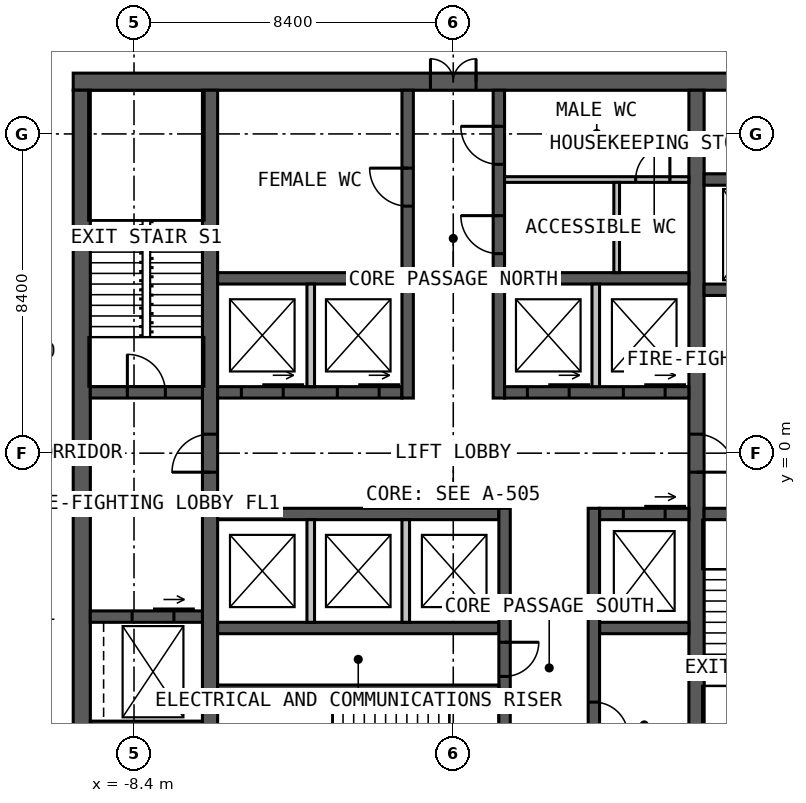
"""IFC4 building model, lengths in metres.
Left out: names, types, materials, properties, quantities, classifications, styles, units other than length and angle.
Written with IfcOpenShell. Run it as: python <this file> out.ifc"""

import sys

from ifc_helpers import new_model, si_unit, direction, frame, frame_2d, origin, place, context, subcontext, project, spatial, rectangle, extrude, element, fill, save


model = new_model("IFC4")
c1 = context("Model", 3, precision=1e-05, world=origin(), true_north=direction((0.0, 1.0)))
c2 = subcontext(c1, "Body", "Model", "MODEL_VIEW")
j1 = project(units=[si_unit("LENGTHUNIT", "METRE"), si_unit("PLANEANGLEUNIT", "RADIAN")], contexts=[c1])
p1 = place(None, origin())
s1 = spatial("IfcSite", under=j1, at=p1, CompositionType="ELEMENT")
p2 = place(p1, origin())
s2 = spatial("IfcBuilding", under=s1, at=p2, CompositionType="ELEMENT")
p3 = place(p2, frame((0.0, 0.0, 159.0)))
s3 = spatial("IfcBuildingStorey", under=s2, at=p3, CompositionType="ELEMENT", Elevation=159.0)
p4 = place(p3, frame((-10.0, 9.775, 0.0), z_axis=(0.0, 0.0, 1.0), x_axis=(1.0, 0.0, 0.0)))
e1 = element("IfcWall", 1, at=p4, inside=s3, PredefinedType="SOLIDWALL", context=c2, shape_type="SweptSolid", body=[
    extrude(rectangle(XDim=20.0, YDim=0.45, at=frame_2d((10.0, 0.0))), origin(), (0.0, 0.0, 1.0), 4.0),
])
p5 = place(p4, frame((9.4, 0.0, 0.0)))
e2 = element("IfcOpeningElement", 2, at=p5, cuts=e1, PredefinedType="OPENING", context=c2, shape_type="SweptSolid", body=[
    extrude(rectangle(XDim=1.2, YDim=2.2, at=frame_2d((0.6, 1.1))), frame((0.0, 0.235, 0.0), z_axis=(0.0, -1.0, 0.0), x_axis=(1.0, 0.0, 0.0)), (0.0, 0.0, 1.0), 0.47),
])
p6 = place(p3, frame((-9.775, 9.55, 0.0), z_axis=(0.0, 0.0, 1.0), x_axis=(0.0, -1.0, 0.0)))
e3 = element("IfcWall", 3, at=p6, inside=s3, PredefinedType="SOLIDWALL", context=c2, shape_type="SweptSolid", body=[
    extrude(rectangle(XDim=19.1, YDim=0.45, at=frame_2d((9.55, 0.0))), origin(), (0.0, 0.0, 1.0), 4.0),
])
p7 = place(p3, frame((-6.4, -9.55, 0.0), z_axis=(0.0, 0.0, 1.0), x_axis=(0.0, 1.0, 0.0)))
e4 = element("IfcWall", 4, at=p7, inside=s3, PredefinedType="SOLIDWALL", context=c2, shape_type="SweptSolid", body=[
    extrude(rectangle(XDim=19.1, YDim=0.4, at=frame_2d((9.55, 0.0))), origin(), (0.0, 0.0, 1.0), 4.0),
])
p8 = place(p7, frame((9.05, 0.0, 0.0)))
e5 = element("IfcOpeningElement", 5, at=p8, cuts=e4, PredefinedType="OPENING", context=c2, shape_type="SweptSolid", body=[
    extrude(rectangle(XDim=1.0, YDim=2.2, at=frame_2d((0.5, 1.1))), frame((0.0, 0.21, 0.0), z_axis=(0.0, -1.0, 0.0), x_axis=(1.0, 0.0, 0.0)), (0.0, 0.0, 1.0), 0.42),
])
p9 = place(p3, frame((6.4, 9.55, 0.0), z_axis=(0.0, 0.0, 1.0), x_axis=(0.0, -1.0, 0.0)))
e6 = element("IfcWall", 6, at=p9, inside=s3, PredefinedType="SOLIDWALL", context=c2, shape_type="SweptSolid", body=[
    extrude(rectangle(XDim=19.1, YDim=0.4, at=frame_2d((9.55, 0.0))), origin(), (0.0, 0.0, 1.0), 4.0),
])
p10 = place(p9, frame((9.05, 0.0, 0.0)))
e7 = element("IfcOpeningElement", 7, at=p10, cuts=e6, PredefinedType="OPENING", context=c2, shape_type="SweptSolid", body=[
    extrude(rectangle(XDim=1.0, YDim=2.2, at=frame_2d((0.5, 1.1))), frame((0.0, 0.21, 0.0), z_axis=(0.0, -1.0, 0.0), x_axis=(1.0, 0.0, 0.0)), (0.0, 0.0, 1.0), 0.42),
])
p11 = place(p3, frame((-6.2, 1.6, 0.0), z_axis=(0.0, 0.0, 1.0), x_axis=(1.0, 0.0, 0.0)))
e8 = element("IfcWall", 8, at=p11, inside=s3, PredefinedType="SOLIDWALL", context=c2, shape_type="SweptSolid", body=[
    extrude(rectangle(XDim=4.85, YDim=0.3, at=frame_2d((2.425, 0.0))), origin(), (0.0, 0.0, 1.0), 4.0),
])
p12 = place(p11, frame((0.625, 0.0, 0.0)))
e9 = element("IfcOpeningElement", 9, at=p12, cuts=e8, PredefinedType="OPENING", context=c2, shape_type="SweptSolid", body=[
    extrude(rectangle(XDim=1.1, YDim=2.2, at=frame_2d((0.55, 1.1))), frame((0.0, 0.16, 0.0), z_axis=(0.0, -1.0, 0.0), x_axis=(1.0, 0.0, 0.0)), (0.0, 0.0, 1.0), 0.32),
])
p13 = place(p11, frame((3.15, 0.0, 0.0)))
e10 = element("IfcOpeningElement", 10, at=p13, cuts=e8, PredefinedType="OPENING", context=c2, shape_type="SweptSolid", body=[
    extrude(rectangle(XDim=1.1, YDim=2.2, at=frame_2d((0.55, 1.1))), frame((0.0, 0.16, 0.0), z_axis=(0.0, -1.0, 0.0), x_axis=(1.0, 0.0, 0.0)), (0.0, 0.0, 1.0), 0.32),
])
p14 = place(p3, frame((1.35, 1.6, 0.0), z_axis=(0.0, 0.0, 1.0), x_axis=(1.0, 0.0, 0.0)))
e11 = element("IfcWall", 11, at=p14, inside=s3, PredefinedType="SOLIDWALL", context=c2, shape_type="SweptSolid", body=[
    extrude(rectangle(XDim=4.85, YDim=0.3, at=frame_2d((2.425, 0.0))), origin(), (0.0, 0.0, 1.0), 4.0),
])
p15 = place(p14, frame((0.6, 0.0, 0.0)))
e12 = element("IfcOpeningElement", 12, at=p15, cuts=e11, PredefinedType="OPENING", context=c2, shape_type="SweptSolid", body=[
    extrude(rectangle(XDim=1.1, YDim=2.2, at=frame_2d((0.55, 1.1))), frame((0.0, 0.16, 0.0), z_axis=(0.0, -1.0, 0.0), x_axis=(1.0, 0.0, 0.0)), (0.0, 0.0, 1.0), 0.32),
])
p16 = place(p14, frame((3.125, 0.0, 0.0)))
e13 = element("IfcOpeningElement", 13, at=p16, cuts=e11, PredefinedType="OPENING", context=c2, shape_type="SweptSolid", body=[
    extrude(rectangle(XDim=1.1, YDim=2.2, at=frame_2d((0.55, 1.1))), frame((0.0, 0.16, 0.0), z_axis=(0.0, -1.0, 0.0), x_axis=(1.0, 0.0, 0.0)), (0.0, 0.0, 1.0), 0.32),
])
for number, where, z_axis, x_axis in (
    (14, (-6.2, 4.6, 0.0), (0.0, 0.0, 1.0), (1.0, 0.0, 0.0)),
    (15, (1.35, 4.6, 0.0), (0.0, 0.0, 1.0), (1.0, 0.0, 0.0)),
):
    element("IfcWall", number, at=place(p3, frame(where, z_axis=z_axis, x_axis=x_axis)), inside=s3, PredefinedType="SOLIDWALL", context=c2, shape_type="SweptSolid", body=[
        extrude(rectangle(XDim=4.85, YDim=0.3, at=frame_2d((2.425, 0.0))), origin(), (0.0, 0.0, 1.0), 4.0),
    ])
p17 = place(p3, frame((-1.2, 1.45, 0.0), z_axis=(0.0, 0.0, 1.0), x_axis=(0.0, 1.0, 0.0)))
e16 = element("IfcWall", 16, at=p17, inside=s3, PredefinedType="SOLIDWALL", context=c2, shape_type="SweptSolid", body=[
    extrude(rectangle(XDim=8.1, YDim=0.3, at=frame_2d((4.05, 0.0))), origin(), (0.0, 0.0, 1.0), 4.0),
])
p18 = place(p17, frame((5.05, 0.0, 0.0)))
e17 = element("IfcOpeningElement", 17, at=p18, cuts=e16, PredefinedType="OPENING", context=c2, shape_type="SweptSolid", body=[
    extrude(rectangle(XDim=1.0, YDim=2.2, at=frame_2d((0.5, 1.1))), frame((0.0, 0.16, 0.0), z_axis=(0.0, -1.0, 0.0), x_axis=(1.0, 0.0, 0.0)), (0.0, 0.0, 1.0), 0.32),
])
p19 = place(p3, frame((1.2, 1.45, 0.0), z_axis=(0.0, 0.0, 1.0), x_axis=(0.0, 1.0, 0.0)))
e18 = element("IfcWall", 18, at=p19, inside=s3, PredefinedType="SOLIDWALL", context=c2, shape_type="SweptSolid", body=[
    extrude(rectangle(XDim=8.1, YDim=0.3, at=frame_2d((4.05, 0.0))), origin(), (0.0, 0.0, 1.0), 4.0),
])
p20 = place(p19, frame((3.8, 0.0, 0.0)))
e19 = element("IfcOpeningElement", 19, at=p20, cuts=e18, PredefinedType="OPENING", context=c2, shape_type="SweptSolid", body=[
    extrude(rectangle(XDim=1.0, YDim=2.2, at=frame_2d((0.5, 1.1))), frame((0.0, 0.16, 0.0), z_axis=(0.0, -1.0, 0.0), x_axis=(1.0, 0.0, 0.0)), (0.0, 0.0, 1.0), 0.32),
])
p21 = place(p19, frame((6.15, 0.0, 0.0)))
e20 = element("IfcOpeningElement", 20, at=p21, cuts=e18, PredefinedType="OPENING", context=c2, shape_type="SweptSolid", body=[
    extrude(rectangle(XDim=1.0, YDim=2.2, at=frame_2d((0.5, 1.1))), frame((0.0, 0.16, 0.0), z_axis=(0.0, -1.0, 0.0), x_axis=(1.0, 0.0, 0.0)), (0.0, 0.0, 1.0), 0.32),
])
p22 = place(p3, frame((-6.2, -1.6, 0.0), z_axis=(0.0, 0.0, 1.0), x_axis=(1.0, 0.0, 0.0)))
e21 = element("IfcWall", 21, at=p22, inside=s3, PredefinedType="SOLIDWALL", context=c2, shape_type="SweptSolid", body=[
    extrude(rectangle(XDim=7.4, YDim=0.3, at=frame_2d((3.7, 0.0))), origin(), (0.0, 0.0, 1.0), 4.0),
])
p23 = place(p3, frame((3.85, -1.6, 0.0), z_axis=(0.0, 0.0, 1.0), x_axis=(1.0, 0.0, 0.0)))
e22 = element("IfcWall", 22, at=p23, inside=s3, PredefinedType="SOLIDWALL", context=c2, shape_type="SweptSolid", body=[
    extrude(rectangle(XDim=2.35, YDim=0.3, at=frame_2d((1.175, 0.0))), origin(), (0.0, 0.0, 1.0), 4.0),
])
p24 = place(p23, frame((0.625, 0.0, 0.0)))
e23 = element("IfcOpeningElement", 23, at=p24, cuts=e22, PredefinedType="OPENING", context=c2, shape_type="SweptSolid", body=[
    extrude(rectangle(XDim=1.1, YDim=2.2, at=frame_2d((0.55, 1.1))), frame((0.0, 0.16, 0.0), z_axis=(0.0, -1.0, 0.0), x_axis=(1.0, 0.0, 0.0)), (0.0, 0.0, 1.0), 0.32),
])
p25 = place(p3, frame((-6.2, -4.6, 0.0), z_axis=(0.0, 0.0, 1.0), x_axis=(1.0, 0.0, 0.0)))
e24 = element("IfcWall", 24, at=p25, inside=s3, PredefinedType="SOLIDWALL", context=c2, shape_type="SweptSolid", body=[
    extrude(rectangle(XDim=7.4, YDim=0.3, at=frame_2d((3.7, 0.0))), origin(), (0.0, 0.0, 1.0), 4.0),
])
p26 = place(p3, frame((3.85, -4.6, 0.0), z_axis=(0.0, 0.0, 1.0), x_axis=(1.0, 0.0, 0.0)))
e25 = element("IfcWall", 25, at=p26, inside=s3, PredefinedType="SOLIDWALL", context=c2, shape_type="SweptSolid", body=[
    extrude(rectangle(XDim=2.35, YDim=0.3, at=frame_2d((1.175, 0.0))), origin(), (0.0, 0.0, 1.0), 4.0),
])
p27 = place(p3, frame((1.35, -1.45, 0.0), z_axis=(0.0, 0.0, 1.0), x_axis=(0.0, -1.0, 0.0)))
e26 = element("IfcWall", 26, at=p27, inside=s3, PredefinedType="SOLIDWALL", context=c2, shape_type="SweptSolid", body=[
    extrude(rectangle(XDim=8.1, YDim=0.3, at=frame_2d((4.05, 0.0))), origin(), (0.0, 0.0, 1.0), 4.0),
])
p28 = place(p27, frame((5.975, 0.0, 0.0)))
e27 = element("IfcOpeningElement", 27, at=p28, cuts=e26, PredefinedType="OPENING", context=c2, shape_type="SweptSolid", body=[
    extrude(rectangle(XDim=1.0, YDim=2.2, at=frame_2d((0.5, 1.1))), frame((0.0, 0.16, 0.0), z_axis=(0.0, -1.0, 0.0), x_axis=(1.0, 0.0, 0.0)), (0.0, 0.0, 1.0), 0.32),
])
p29 = place(p27, frame((3.525, 0.0, 0.0)))
e28 = element("IfcOpeningElement", 28, at=p29, cuts=e26, PredefinedType="OPENING", context=c2, shape_type="SweptSolid", body=[
    extrude(rectangle(XDim=0.9, YDim=2.2, at=frame_2d((0.45, 1.1))), frame((0.0, 0.16, 0.0), z_axis=(0.0, -1.0, 0.0), x_axis=(1.0, 0.0, 0.0)), (0.0, 0.0, 1.0), 0.32),
])
p30 = place(p3, frame((3.7, -1.45, 0.0), z_axis=(0.0, 0.0, 1.0), x_axis=(0.0, -1.0, 0.0)))
e29 = element("IfcWall", 29, at=p30, inside=s3, PredefinedType="SOLIDWALL", context=c2, shape_type="SweptSolid", body=[
    extrude(rectangle(XDim=8.1, YDim=0.3, at=frame_2d((4.05, 0.0))), origin(), (0.0, 0.0, 1.0), 4.0),
])
p31 = place(p30, frame((5.1, 0.0, 0.0)))
e30 = element("IfcOpeningElement", 30, at=p31, cuts=e29, PredefinedType="OPENING", context=c2, shape_type="SweptSolid", body=[
    extrude(rectangle(XDim=0.9, YDim=2.2, at=frame_2d((0.45, 1.1))), frame((0.0, 0.16, 0.0), z_axis=(0.0, -1.0, 0.0), x_axis=(1.0, 0.0, 0.0)), (0.0, 0.0, 1.0), 0.32),
])
p32 = place(p3, frame((-6.2, -6.2, 0.0), z_axis=(0.0, 0.0, 1.0), x_axis=(1.0, 0.0, 0.0)))
e31 = element("IfcWall", 31, at=p32, inside=s3, PredefinedType="SOLIDWALL", context=c2, shape_type="SweptSolid", body=[
    extrude(rectangle(XDim=7.4, YDim=0.2, at=frame_2d((3.7, 0.0))), origin(), (0.0, 0.0, 1.0), 4.0),
])
p33 = place(p3, frame((-9.55, 1.6, 0.0), z_axis=(0.0, 0.0, 1.0), x_axis=(1.0, 0.0, 0.0)))
e32 = element("IfcWall", 32, at=p33, inside=s3, PredefinedType="SOLIDWALL", context=c2, shape_type="SweptSolid", body=[
    extrude(rectangle(XDim=2.95, YDim=0.3, at=frame_2d((1.475, 0.0))), origin(), (0.0, 0.0, 1.0), 4.0),
])
p34 = place(p33, frame((0.975, 0.0, 0.0)))
e33 = element("IfcOpeningElement", 33, at=p34, cuts=e32, PredefinedType="OPENING", context=c2, shape_type="SweptSolid", body=[
    extrude(rectangle(XDim=1.0, YDim=2.2, at=frame_2d((0.5, 1.1))), frame((0.0, 0.16, 0.0), z_axis=(0.0, -1.0, 0.0), x_axis=(1.0, 0.0, 0.0)), (0.0, 0.0, 1.0), 0.32),
])
p35 = place(p3, frame((6.6, -1.6, 0.0), z_axis=(0.0, 0.0, 1.0), x_axis=(1.0, 0.0, 0.0)))
e34 = element("IfcWall", 34, at=p35, inside=s3, PredefinedType="SOLIDWALL", context=c2, shape_type="SweptSolid", body=[
    extrude(rectangle(XDim=2.95, YDim=0.3, at=frame_2d((1.475, 0.0))), origin(), (0.0, 0.0, 1.0), 4.0),
])
p36 = place(p35, frame((0.975, 0.0, 0.0)))
e35 = element("IfcOpeningElement", 35, at=p36, cuts=e34, PredefinedType="OPENING", context=c2, shape_type="SweptSolid", body=[
    extrude(rectangle(XDim=1.0, YDim=2.2, at=frame_2d((0.5, 1.1))), frame((0.0, 0.16, 0.0), z_axis=(0.0, -1.0, 0.0), x_axis=(1.0, 0.0, 0.0)), (0.0, 0.0, 1.0), 0.32),
])
p37 = place(p3, frame((-9.55, -4.3, 0.0), z_axis=(0.0, 0.0, 1.0), x_axis=(1.0, 0.0, 0.0)))
e36 = element("IfcWall", 36, at=p37, inside=s3, PredefinedType="SOLIDWALL", context=c2, shape_type="SweptSolid", body=[
    extrude(rectangle(XDim=2.95, YDim=0.3, at=frame_2d((1.475, 0.0))), origin(), (0.0, 0.0, 1.0), 4.0),
])
p38 = place(p37, frame((1.1, 0.0, 0.0)))
e37 = element("IfcOpeningElement", 37, at=p38, cuts=e36, PredefinedType="OPENING", context=c2, shape_type="SweptSolid", body=[
    extrude(rectangle(XDim=1.1, YDim=2.2, at=frame_2d((0.55, 1.1))), frame((0.0, 0.16, 0.0), z_axis=(0.0, -1.0, 0.0), x_axis=(1.0, 0.0, 0.0)), (0.0, 0.0, 1.0), 0.32),
])
p39 = place(p3, frame((6.6, 4.3, 0.0), z_axis=(0.0, 0.0, 1.0), x_axis=(1.0, 0.0, 0.0)))
e38 = element("IfcWall", 38, at=p39, inside=s3, PredefinedType="SOLIDWALL", context=c2, shape_type="SweptSolid", body=[
    extrude(rectangle(XDim=2.95, YDim=0.3, at=frame_2d((1.475, 0.0))), origin(), (0.0, 0.0, 1.0), 4.0),
])
p40 = place(p39, frame((0.75, 0.0, 0.0)))
e39 = element("IfcOpeningElement", 39, at=p40, cuts=e38, PredefinedType="OPENING", context=c2, shape_type="SweptSolid", body=[
    extrude(rectangle(XDim=1.1, YDim=2.2, at=frame_2d((0.55, 1.1))), frame((0.0, 0.16, 0.0), z_axis=(0.0, -1.0, 0.0), x_axis=(1.0, 0.0, 0.0)), (0.0, 0.0, 1.0), 0.32),
])
for number, where, z_axis, x_axis in (
    (40, (-9.55, -7.2, 0.0), (0.0, 0.0, 1.0), (1.0, 0.0, 0.0)),
    (41, (6.6, 7.2, 0.0), (0.0, 0.0, 1.0), (1.0, 0.0, 0.0)),
):
    element("IfcWall", number, at=place(p3, frame(where, z_axis=z_axis, x_axis=x_axis)), inside=s3, PredefinedType="SOLIDWALL", context=c2, shape_type="SweptSolid", body=[
        extrude(rectangle(XDim=2.95, YDim=0.3, at=frame_2d((1.475, 0.0))), origin(), (0.0, 0.0, 1.0), 4.0),
    ])
for number, where, z_axis, x_axis in (
    (42, (-3.75, 1.75, 0.0), (0.0, 0.0, 1.0), (0.0, 1.0, 0.0)),
    (43, (3.75, 1.75, 0.0), (0.0, 0.0, 1.0), (0.0, 1.0, 0.0)),
    (44, (-3.75, -1.75, 0.0), (0.0, 0.0, 1.0), (0.0, -1.0, 0.0)),
    (45, (-1.25, -1.75, 0.0), (0.0, 0.0, 1.0), (0.0, -1.0, 0.0)),
):
    element("IfcWall", number, at=place(p3, frame(where, z_axis=z_axis, x_axis=x_axis)), inside=s3, PredefinedType="SOLIDWALL", context=c2, shape_type="SweptSolid", body=[
        extrude(rectangle(XDim=2.7, YDim=0.2, at=frame_2d((1.35, 0.0))), origin(), (0.0, 0.0, 1.0), 3.75),
    ])
p41 = place(p3, frame((1.35, 7.2, 0.0), z_axis=(0.0, 0.0, 1.0), x_axis=(1.0, 0.0, 0.0)))
e46 = element("IfcWall", 46, at=p41, inside=s3, PredefinedType="PARTITIONING", context=c2, shape_type="SweptSolid", body=[
    extrude(rectangle(XDim=4.85, YDim=0.15, at=frame_2d((2.425, 0.0))), origin(), (0.0, 0.0, 1.0), 3.75),
])
p42 = place(p41, frame((3.45, 0.0, 0.0)))
e47 = element("IfcOpeningElement", 47, at=p42, cuts=e46, PredefinedType="OPENING", context=c2, shape_type="SweptSolid", body=[
    extrude(rectangle(XDim=0.9, YDim=2.2, at=frame_2d((0.45, 1.1))), frame((0.0, 0.085, 0.0), z_axis=(0.0, -1.0, 0.0), x_axis=(1.0, 0.0, 0.0)), (0.0, 0.0, 1.0), 0.17),
])
p43 = place(p3, frame((4.3, 4.75, 0.0), z_axis=(0.0, 0.0, 1.0), x_axis=(0.0, 1.0, 0.0)))
e48 = element("IfcWall", 48, at=p43, inside=s3, PredefinedType="PARTITIONING", context=c2, shape_type="SweptSolid", body=[
    extrude(rectangle(XDim=2.375, YDim=0.15, at=frame_2d((1.188, 0.0))), origin(), (0.0, 0.0, 1.0), 3.75),
])
p44 = place(p5, origin())
e49 = element("IfcDoor", 49, at=p44, inside=s3, OperationType="DOUBLE_DOOR_SINGLE_SWING", PredefinedType="DOOR", context=c2, shape_type="SweptSolid", body=[
    extrude(rectangle(XDim=1.2, YDim=2.2, at=frame_2d((0.6, 1.1))), frame((0.0, 0.025, 0.0), z_axis=(0.0, -1.0, 0.0), x_axis=(1.0, 0.0, 0.0)), (0.0, 0.0, 1.0), 0.05),
])
fill(e2, e49)
p45 = place(p8, origin())
e50 = element("IfcDoor", 50, at=p45, inside=s3, OperationType="SINGLE_SWING_LEFT", PredefinedType="DOOR", context=c2, shape_type="SweptSolid", body=[
    extrude(rectangle(XDim=1.0, YDim=2.2, at=frame_2d((0.5, 1.1))), frame((0.0, 0.025, 0.0), z_axis=(0.0, -1.0, 0.0), x_axis=(1.0, 0.0, 0.0)), (0.0, 0.0, 1.0), 0.05),
])
fill(e5, e50)
p46 = place(p10, origin())
e51 = element("IfcDoor", 51, at=p46, inside=s3, OperationType="SINGLE_SWING_RIGHT", PredefinedType="DOOR", context=c2, shape_type="SweptSolid", body=[
    extrude(rectangle(XDim=1.0, YDim=2.2, at=frame_2d((0.5, 1.1))), frame((0.0, 0.025, 0.0), z_axis=(0.0, -1.0, 0.0), x_axis=(1.0, 0.0, 0.0)), (0.0, 0.0, 1.0), 0.05),
])
fill(e7, e51)
p47 = place(p34, origin())
e52 = element("IfcDoor", 52, at=p47, inside=s3, OperationType="SINGLE_SWING_LEFT", PredefinedType="DOOR", context=c2, shape_type="SweptSolid", body=[
    extrude(rectangle(XDim=1.0, YDim=2.2, at=frame_2d((0.5, 1.1))), frame((0.0, 0.025, 0.0), z_axis=(0.0, -1.0, 0.0), x_axis=(1.0, 0.0, 0.0)), (0.0, 0.0, 1.0), 0.05),
])
fill(e33, e52)
p48 = place(p18, origin())
e53 = element("IfcDoor", 53, at=p48, inside=s3, OperationType="SINGLE_SWING_RIGHT", PredefinedType="DOOR", context=c2, shape_type="SweptSolid", body=[
    extrude(rectangle(XDim=1.0, YDim=2.2, at=frame_2d((0.5, 1.1))), frame((0.0, 0.025, 0.0), z_axis=(0.0, -1.0, 0.0), x_axis=(1.0, 0.0, 0.0)), (0.0, 0.0, 1.0), 0.05),
])
fill(e17, e53)
p49 = place(p20, origin())
e54 = element("IfcDoor", 54, at=p49, inside=s3, OperationType="SINGLE_SWING_RIGHT", PredefinedType="DOOR", context=c2, shape_type="SweptSolid", body=[
    extrude(rectangle(XDim=1.0, YDim=2.2, at=frame_2d((0.5, 1.1))), frame((0.0, 0.025, 0.0), z_axis=(0.0, -1.0, 0.0), x_axis=(1.0, 0.0, 0.0)), (0.0, 0.0, 1.0), 0.05),
])
fill(e19, e54)
p50 = place(p21, origin())
e55 = element("IfcDoor", 55, at=p50, inside=s3, OperationType="SINGLE_SWING_RIGHT", PredefinedType="DOOR", context=c2, shape_type="SweptSolid", body=[
    extrude(rectangle(XDim=1.0, YDim=2.2, at=frame_2d((0.5, 1.1))), frame((0.0, 0.025, 0.0), z_axis=(0.0, -1.0, 0.0), x_axis=(1.0, 0.0, 0.0)), (0.0, 0.0, 1.0), 0.05),
])
fill(e20, e55)
p51 = place(p29, origin())
e56 = element("IfcDoor", 56, at=p51, inside=s3, OperationType="SINGLE_SWING_LEFT", PredefinedType="DOOR", context=c2, shape_type="SweptSolid", body=[
    extrude(rectangle(XDim=0.9, YDim=2.2, at=frame_2d((0.45, 1.1))), frame((0.0, 0.025, 0.0), z_axis=(0.0, -1.0, 0.0), x_axis=(1.0, 0.0, 0.0)), (0.0, 0.0, 1.0), 0.05),
])
fill(e28, e56)
p52 = place(p31, origin())
e57 = element("IfcDoor", 57, at=p52, inside=s3, OperationType="SINGLE_SWING_RIGHT", PredefinedType="DOOR", context=c2, shape_type="SweptSolid", body=[
    extrude(rectangle(XDim=0.9, YDim=2.2, at=frame_2d((0.45, 1.1))), frame((0.0, 0.025, 0.0), z_axis=(0.0, -1.0, 0.0), x_axis=(1.0, 0.0, 0.0)), (0.0, 0.0, 1.0), 0.05),
])
fill(e30, e57)
p53 = place(p42, origin())
e58 = element("IfcDoor", 58, at=p53, inside=s3, OperationType="SINGLE_SWING_RIGHT", PredefinedType="DOOR", context=c2, shape_type="SweptSolid", body=[
    extrude(rectangle(XDim=0.9, YDim=2.2, at=frame_2d((0.45, 1.1))), frame((0.0, 0.025, 0.0), z_axis=(0.0, -1.0, 0.0), x_axis=(1.0, 0.0, 0.0)), (0.0, 0.0, 1.0), 0.05),
])
fill(e47, e58)
p54 = place(p12, origin())
e59 = element("IfcDoor", 59, at=p54, inside=s3, OperationType="SLIDING_TO_LEFT", PredefinedType="DOOR", context=c2, shape_type="SweptSolid", body=[
    extrude(rectangle(XDim=1.1, YDim=2.2, at=frame_2d((0.55, 1.1))), frame((0.0, 0.025, 0.0), z_axis=(0.0, -1.0, 0.0), x_axis=(1.0, 0.0, 0.0)), (0.0, 0.0, 1.0), 0.05),
])
fill(e9, e59)
p55 = place(p13, origin())
e60 = element("IfcDoor", 60, at=p55, inside=s3, OperationType="SLIDING_TO_LEFT", PredefinedType="DOOR", context=c2, shape_type="SweptSolid", body=[
    extrude(rectangle(XDim=1.1, YDim=2.2, at=frame_2d((0.55, 1.1))), frame((0.0, 0.025, 0.0), z_axis=(0.0, -1.0, 0.0), x_axis=(1.0, 0.0, 0.0)), (0.0, 0.0, 1.0), 0.05),
])
fill(e10, e60)
p56 = place(p15, origin())
e61 = element("IfcDoor", 61, at=p56, inside=s3, OperationType="SLIDING_TO_LEFT", PredefinedType="DOOR", context=c2, shape_type="SweptSolid", body=[
    extrude(rectangle(XDim=1.1, YDim=2.2, at=frame_2d((0.55, 1.1))), frame((0.0, 0.025, 0.0), z_axis=(0.0, -1.0, 0.0), x_axis=(1.0, 0.0, 0.0)), (0.0, 0.0, 1.0), 0.05),
])
fill(e12, e61)
p57 = place(p16, origin())
e62 = element("IfcDoor", 62, at=p57, inside=s3, OperationType="SLIDING_TO_LEFT", PredefinedType="DOOR", context=c2, shape_type="SweptSolid", body=[
    extrude(rectangle(XDim=1.1, YDim=2.2, at=frame_2d((0.55, 1.1))), frame((0.0, 0.025, 0.0), z_axis=(0.0, -1.0, 0.0), x_axis=(1.0, 0.0, 0.0)), (0.0, 0.0, 1.0), 0.05),
])
fill(e13, e62)
p58 = place(p24, origin())
e63 = element("IfcDoor", 63, at=p58, inside=s3, OperationType="SLIDING_TO_LEFT", PredefinedType="DOOR", context=c2, shape_type="SweptSolid", body=[
    extrude(rectangle(XDim=1.1, YDim=2.2, at=frame_2d((0.55, 1.1))), frame((0.0, 0.025, 0.0), z_axis=(0.0, -1.0, 0.0), x_axis=(1.0, 0.0, 0.0)), (0.0, 0.0, 1.0), 0.05),
])
fill(e23, e63)
p59 = place(p38, origin())
e64 = element("IfcDoor", 64, at=p59, inside=s3, OperationType="SLIDING_TO_LEFT", PredefinedType="DOOR", context=c2, shape_type="SweptSolid", body=[
    extrude(rectangle(XDim=1.1, YDim=2.2, at=frame_2d((0.55, 1.1))), frame((0.0, 0.025, 0.0), z_axis=(0.0, -1.0, 0.0), x_axis=(1.0, 0.0, 0.0)), (0.0, 0.0, 1.0), 0.05),
])
fill(e37, e64)
save(model, sys.argv[1])
